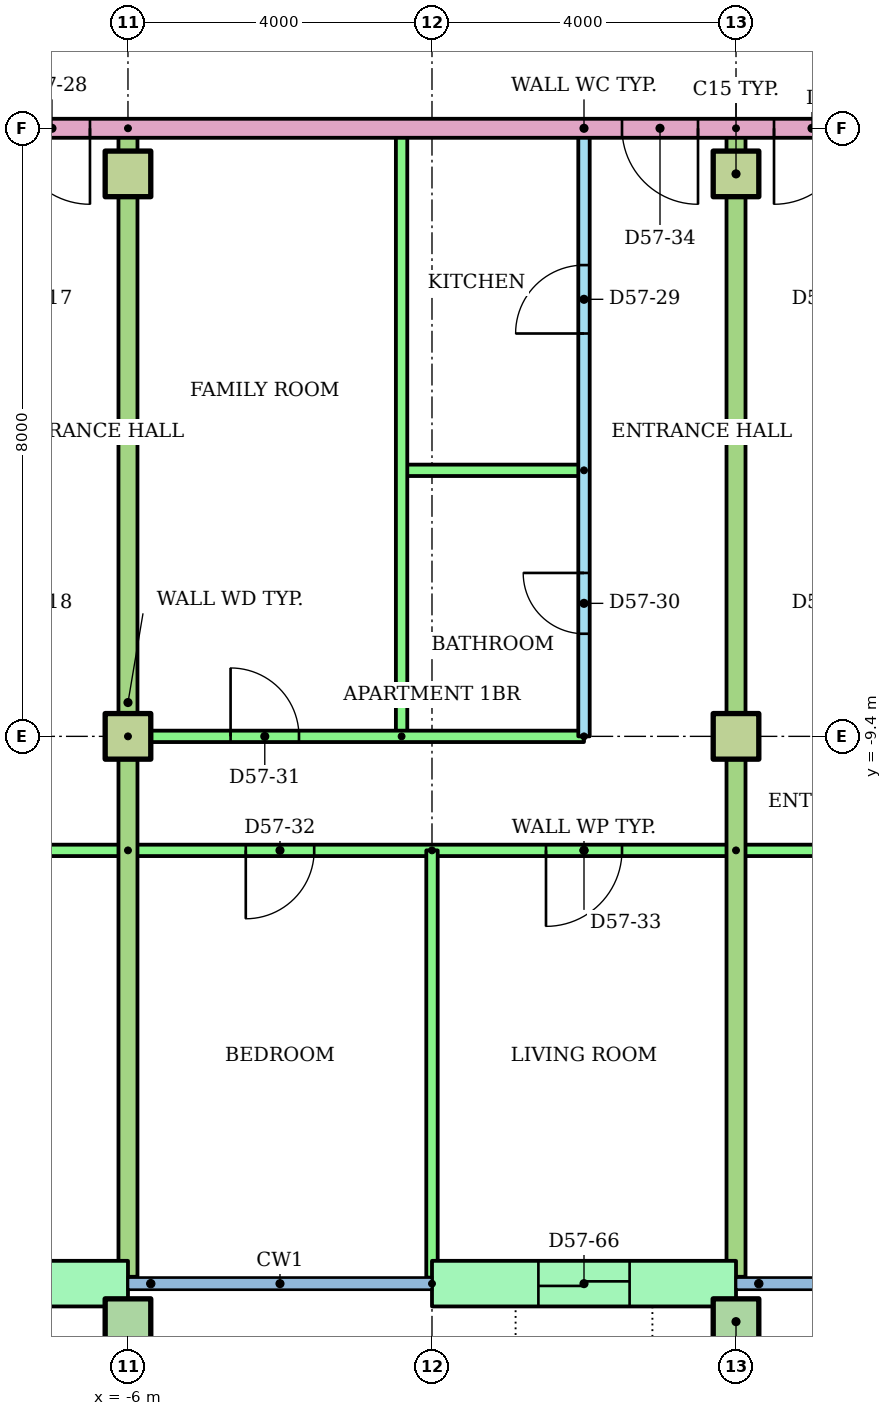
"""IFC4 building model, lengths in metres.
Left out: names, types, materials, properties, quantities, classifications, styles, units other than length and angle.
Written with IfcOpenShell. Run it as: python <this file> out.ifc"""

import sys

from ifc_helpers import new_model, si_unit, direction, frame, frame_2d, origin, origin_2d, place, context, subcontext, project, spatial, rectangle, hollow_rectangle, extrude, element, fill, save


model = new_model("IFC4")
c1 = context("Model", 3, precision=1e-05, world=origin(), true_north=direction((0.0, 1.0)))
c2 = subcontext(c1, "Body", "Model", "MODEL_VIEW")
j1 = project(units=[si_unit("LENGTHUNIT", "METRE"), si_unit("PLANEANGLEUNIT", "RADIAN")], contexts=[c1])
p1 = place(None, origin())
s1 = spatial("IfcSite", under=j1, at=p1, CompositionType="ELEMENT")
p2 = place(p1, origin())
s2 = spatial("IfcBuilding", under=s1, at=p2, CompositionType="ELEMENT")
p3 = place(p2, frame((0.0, 0.0, 220.4)))
s3 = spatial("IfcBuildingStorey", under=s2, at=p3, CompositionType="ELEMENT", Elevation=220.4)
for number, where in (
    (1, (-6.0, -17.1, 0.0)),
    (2, (2.0, -17.1, 0.0)),
):
    element("IfcColumn", number, at=place(p3, frame(where)), inside=s3, PredefinedType="COLUMN", context=c2, shape_type="SweptSolid", body=[
        extrude(hollow_rectangle(XDim=0.6, YDim=0.6, WallThickness=0.03, at=origin_2d()), origin(), (0.0, 0.0, 1.0), 3.2),
    ])
for number, where in (
    (3, (-6.0, -9.4, 0.0)),
    (4, (2.0, -9.4, 0.0)),
    (5, (-6.0, -2.0, 0.0)),
    (6, (2.0, -2.0, 0.0)),
):
    element("IfcColumn", number, at=place(p3, frame(where)), inside=s3, PredefinedType="COLUMN", context=c2, shape_type="SweptSolid", body=[
        extrude(rectangle(XDim=0.6, YDim=0.6, at=origin_2d()), origin(), (0.0, 0.0, 1.0), 3.2),
    ])
p4 = place(p3, frame((-10.0, -16.6, 0.0)))
e7 = element("IfcWall", 7, at=p4, inside=s3, PredefinedType="STANDARD", context=c2, shape_type="SweptSolid", body=[
    extrude(rectangle(XDim=4.0, YDim=0.6, at=frame_2d((2.0, 0.0))), origin(), (0.0, 0.0, 1.0), 2.92),
])
p5 = place(p4, frame((1.4, 0.0, 0.0)))
e8 = element("IfcOpeningElement", 8, at=p5, cuts=e7, PredefinedType="OPENING", context=c2, shape_type="SweptSolid", body=[
    extrude(rectangle(XDim=1.2, YDim=2.1, at=frame_2d((0.6, 1.05))), frame((0.0, 0.31, 0.0), z_axis=(0.0, -1.0, 0.0), x_axis=(1.0, 0.0, 0.0)), (0.0, 0.0, 1.0), 0.62),
])
p6 = place(p3, frame((-2.0, -16.6, 0.0)))
e9 = element("IfcWall", 9, at=p6, inside=s3, PredefinedType="STANDARD", context=c2, shape_type="SweptSolid", body=[
    extrude(rectangle(XDim=4.0, YDim=0.6, at=frame_2d((2.0, 0.0))), origin(), (0.0, 0.0, 1.0), 2.92),
])
p7 = place(p6, frame((1.4, 0.0, 0.0)))
e10 = element("IfcOpeningElement", 10, at=p7, cuts=e9, PredefinedType="OPENING", context=c2, shape_type="SweptSolid", body=[
    extrude(rectangle(XDim=1.2, YDim=2.1, at=frame_2d((0.6, 1.05))), frame((0.0, 0.31, 0.0), z_axis=(0.0, -1.0, 0.0), x_axis=(1.0, 0.0, 0.0)), (0.0, 0.0, 1.0), 0.62),
])
p8 = place(p3, frame((-6.0, -10.9, 0.0), z_axis=(0.0, 0.0, 1.0), x_axis=(-1.0, 0.0, 0.0)))
e11 = element("IfcWall", 11, at=p8, inside=s3, PredefinedType="PARTITIONING", context=c2, shape_type="SweptSolid", body=[
    extrude(rectangle(XDim=22.92, YDim=0.15, at=frame_2d((11.46, 0.0))), origin(), (0.0, 0.0, 1.0), 2.4),
])
p9 = place(p8, frame((20.0, 0.0, 0.0)))
e12 = element("IfcOpeningElement", 12, at=p9, cuts=e11, PredefinedType="OPENING", context=c2, shape_type="SweptSolid", body=[
    extrude(rectangle(XDim=0.9, YDim=2.1, at=frame_2d((0.45, 1.05))), frame((0.0, 0.085, 0.0), z_axis=(0.0, -1.0, 0.0), x_axis=(1.0, 0.0, 0.0)), (0.0, 0.0, 1.0), 0.17),
])
p10 = place(p8, frame((14.524, 0.0, 0.0)))
e13 = element("IfcOpeningElement", 13, at=p10, cuts=e11, PredefinedType="OPENING", context=c2, shape_type="SweptSolid", body=[
    extrude(rectangle(XDim=0.9, YDim=2.1, at=frame_2d((0.45, 1.05))), frame((0.0, 0.085, 0.0), z_axis=(0.0, -1.0, 0.0), x_axis=(1.0, 0.0, 0.0)), (0.0, 0.0, 1.0), 0.17),
])
p11 = place(p8, frame((9.55, 0.0, 0.0)))
e14 = element("IfcOpeningElement", 14, at=p11, cuts=e11, PredefinedType="OPENING", context=c2, shape_type="SweptSolid", body=[
    extrude(rectangle(XDim=0.9, YDim=2.1, at=frame_2d((0.45, 1.05))), frame((0.0, 0.085, 0.0), z_axis=(0.0, -1.0, 0.0), x_axis=(1.0, 0.0, 0.0)), (0.0, 0.0, 1.0), 0.17),
])
p12 = place(p8, frame((5.55, 0.0, 0.0)))
e15 = element("IfcOpeningElement", 15, at=p12, cuts=e11, PredefinedType="OPENING", context=c2, shape_type="SweptSolid", body=[
    extrude(rectangle(XDim=0.9, YDim=2.1, at=frame_2d((0.45, 1.05))), frame((0.0, 0.085, 0.0), z_axis=(0.0, -1.0, 0.0), x_axis=(1.0, 0.0, 0.0)), (0.0, 0.0, 1.0), 0.17),
])
p13 = place(p8, frame((1.5, 0.0, 0.0)))
e16 = element("IfcOpeningElement", 16, at=p13, cuts=e11, PredefinedType="OPENING", context=c2, shape_type="SweptSolid", body=[
    extrude(rectangle(XDim=1.0, YDim=2.1, at=frame_2d((0.5, 1.05))), frame((0.0, 0.085, 0.0), z_axis=(0.0, -1.0, 0.0), x_axis=(1.0, 0.0, 0.0)), (0.0, 0.0, 1.0), 0.17),
])
p14 = place(p3, frame((0.0, -9.4, 0.0), z_axis=(0.0, 0.0, 1.0), x_axis=(0.0, 1.0, 0.0)))
e17 = element("IfcWall", 17, at=p14, inside=s3, PredefinedType="PARTITIONING", context=c2, shape_type="SweptSolid", body=[
    extrude(rectangle(XDim=8.0, YDim=0.15, at=frame_2d((4.0, 0.0))), origin(), (0.0, 0.0, 1.0), 2.4),
])
p15 = place(p14, frame((5.3, 0.0, 0.0)))
e18 = element("IfcOpeningElement", 18, at=p15, cuts=e17, PredefinedType="OPENING", context=c2, shape_type="SweptSolid", body=[
    extrude(rectangle(XDim=0.9, YDim=2.1, at=frame_2d((0.45, 1.05))), frame((0.0, 0.085, 0.0), z_axis=(0.0, -1.0, 0.0), x_axis=(1.0, 0.0, 0.0)), (0.0, 0.0, 1.0), 0.17),
])
p16 = place(p14, frame((1.35, 0.0, 0.0)))
e19 = element("IfcOpeningElement", 19, at=p16, cuts=e17, PredefinedType="OPENING", context=c2, shape_type="SweptSolid", body=[
    extrude(rectangle(XDim=0.8, YDim=2.1, at=frame_2d((0.4, 1.05))), frame((0.0, 0.085, 0.0), z_axis=(0.0, -1.0, 0.0), x_axis=(1.0, 0.0, 0.0)), (0.0, 0.0, 1.0), 0.17),
])
p17 = place(p3, frame((0.0, -5.9, 0.0), z_axis=(0.0, 0.0, 1.0), x_axis=(-1.0, 0.0, 0.0)))
e20 = element("IfcWall", 20, at=p17, inside=s3, PredefinedType="PARTITIONING", context=c2, shape_type="SweptSolid", body=[
    extrude(rectangle(XDim=2.4, YDim=0.15, at=frame_2d((1.2, 0.0))), origin(), (0.0, 0.0, 1.0), 2.4),
])
p18 = place(p3, frame((-2.4, -9.4, 0.0), z_axis=(0.0, 0.0, 1.0), x_axis=(0.0, 1.0, 0.0)))
e21 = element("IfcWall", 21, at=p18, inside=s3, PredefinedType="PARTITIONING", context=c2, shape_type="SweptSolid", body=[
    extrude(rectangle(XDim=8.0, YDim=0.15, at=frame_2d((4.0, 0.0))), origin(), (0.0, 0.0, 1.0), 2.4),
])
p19 = place(p3, frame((-6.0, -9.4, 0.0)))
e22 = element("IfcWall", 22, at=p19, inside=s3, PredefinedType="PARTITIONING", context=c2, shape_type="SweptSolid", body=[
    extrude(rectangle(XDim=6.0, YDim=0.15, at=frame_2d((3.0, 0.0))), origin(), (0.0, 0.0, 1.0), 2.4),
])
p20 = place(p19, frame((1.35, 0.0, 0.0)))
e23 = element("IfcOpeningElement", 23, at=p20, cuts=e22, PredefinedType="OPENING", context=c2, shape_type="SweptSolid", body=[
    extrude(rectangle(XDim=0.9, YDim=2.1, at=frame_2d((0.45, 1.05))), frame((0.0, 0.085, 0.0), z_axis=(0.0, -1.0, 0.0), x_axis=(1.0, 0.0, 0.0)), (0.0, 0.0, 1.0), 0.17),
])
p21 = place(p3, frame((2.0, -10.9, 0.0), z_axis=(0.0, 0.0, 1.0), x_axis=(-1.0, 0.0, 0.0)))
e24 = element("IfcWall", 24, at=p21, inside=s3, PredefinedType="PARTITIONING", context=c2, shape_type="SweptSolid", body=[
    extrude(rectangle(XDim=8.0, YDim=0.15, at=frame_2d((4.0, 0.0))), origin(), (0.0, 0.0, 1.0), 2.4),
])
p22 = place(p21, frame((5.55, 0.0, 0.0)))
e25 = element("IfcOpeningElement", 25, at=p22, cuts=e24, PredefinedType="OPENING", context=c2, shape_type="SweptSolid", body=[
    extrude(rectangle(XDim=0.9, YDim=2.1, at=frame_2d((0.45, 1.05))), frame((0.0, 0.085, 0.0), z_axis=(0.0, -1.0, 0.0), x_axis=(1.0, 0.0, 0.0)), (0.0, 0.0, 1.0), 0.17),
])
p23 = place(p21, frame((1.5, 0.0, 0.0)))
e26 = element("IfcOpeningElement", 26, at=p23, cuts=e24, PredefinedType="OPENING", context=c2, shape_type="SweptSolid", body=[
    extrude(rectangle(XDim=1.0, YDim=2.1, at=frame_2d((0.5, 1.05))), frame((0.0, 0.085, 0.0), z_axis=(0.0, -1.0, 0.0), x_axis=(1.0, 0.0, 0.0)), (0.0, 0.0, 1.0), 0.17),
])
p24 = place(p3, frame((-2.0, -10.9, 0.0), z_axis=(0.0, 0.0, 1.0), x_axis=(0.0, -1.0, 0.0)))
e27 = element("IfcWall", 27, at=p24, inside=s3, PredefinedType="PARTITIONING", context=c2, shape_type="SweptSolid", body=[
    extrude(rectangle(XDim=5.621, YDim=0.15, at=frame_2d((2.811, 0.0))), origin(), (0.0, 0.0, 1.0), 2.4),
])
p25 = place(p3, frame((-6.0, -1.4, 0.0), z_axis=(0.0, 0.0, 1.0), x_axis=(0.0, -1.0, 0.0)))
e28 = element("IfcWall", 28, at=p25, inside=s3, PredefinedType="PARTITIONING", context=c2, shape_type="SweptSolid", body=[
    extrude(rectangle(XDim=15.11, YDim=0.25, at=frame_2d((7.555, 0.0))), origin(), (0.0, 0.0, 1.0), 2.4),
])
p26 = place(p3, frame((28.92, -10.9, 0.0), z_axis=(0.0, 0.0, 1.0), x_axis=(-1.0, 0.0, 0.0)))
e29 = element("IfcWall", 29, at=p26, inside=s3, PredefinedType="PARTITIONING", context=c2, shape_type="SweptSolid", body=[
    extrude(rectangle(XDim=26.92, YDim=0.15, at=frame_2d((13.46, 0.0))), origin(), (0.0, 0.0, 1.0), 2.4),
])
p27 = place(p26, frame((22.42, 0.0, 0.0)))
e30 = element("IfcOpeningElement", 30, at=p27, cuts=e29, PredefinedType="OPENING", context=c2, shape_type="SweptSolid", body=[
    extrude(rectangle(XDim=1.0, YDim=2.1, at=frame_2d((0.5, 1.05))), frame((0.0, 0.085, 0.0), z_axis=(0.0, -1.0, 0.0), x_axis=(1.0, 0.0, 0.0)), (0.0, 0.0, 1.0), 0.17),
])
p28 = place(p26, frame((16.47, 0.0, 0.0)))
e31 = element("IfcOpeningElement", 31, at=p28, cuts=e29, PredefinedType="OPENING", context=c2, shape_type="SweptSolid", body=[
    extrude(rectangle(XDim=0.9, YDim=2.1, at=frame_2d((0.45, 1.05))), frame((0.0, 0.085, 0.0), z_axis=(0.0, -1.0, 0.0), x_axis=(1.0, 0.0, 0.0)), (0.0, 0.0, 1.0), 0.17),
])
p29 = place(p26, frame((12.47, 0.0, 0.0)))
e32 = element("IfcOpeningElement", 32, at=p29, cuts=e29, PredefinedType="OPENING", context=c2, shape_type="SweptSolid", body=[
    extrude(rectangle(XDim=0.9, YDim=2.1, at=frame_2d((0.45, 1.05))), frame((0.0, 0.085, 0.0), z_axis=(0.0, -1.0, 0.0), x_axis=(1.0, 0.0, 0.0)), (0.0, 0.0, 1.0), 0.17),
])
p30 = place(p26, frame((7.27, 0.0, 0.0)))
e33 = element("IfcOpeningElement", 33, at=p30, cuts=e29, PredefinedType="OPENING", context=c2, shape_type="SweptSolid", body=[
    extrude(rectangle(XDim=0.9, YDim=2.1, at=frame_2d((0.45, 1.05))), frame((0.0, 0.085, 0.0), z_axis=(0.0, -1.0, 0.0), x_axis=(1.0, 0.0, 0.0)), (0.0, 0.0, 1.0), 0.17),
])
p31 = place(p26, frame((1.544, 0.0, 0.0)))
e34 = element("IfcOpeningElement", 34, at=p31, cuts=e29, PredefinedType="OPENING", context=c2, shape_type="SweptSolid", body=[
    extrude(rectangle(XDim=0.9, YDim=2.1, at=frame_2d((0.45, 1.05))), frame((0.0, 0.085, 0.0), z_axis=(0.0, -1.0, 0.0), x_axis=(1.0, 0.0, 0.0)), (0.0, 0.0, 1.0), 0.17),
])
p32 = place(p3, frame((2.0, -1.4, 0.0), z_axis=(0.0, 0.0, 1.0), x_axis=(0.0, -1.0, 0.0)))
e35 = element("IfcWall", 35, at=p32, inside=s3, PredefinedType="PARTITIONING", context=c2, shape_type="SweptSolid", body=[
    extrude(rectangle(XDim=15.11, YDim=0.25, at=frame_2d((7.555, 0.0))), origin(), (0.0, 0.0, 1.0), 2.4),
])
p33 = place(p3, frame((14.0, -1.4, 0.0), z_axis=(0.0, 0.0, 1.0), x_axis=(-1.0, 0.0, 0.0)))
e36 = element("IfcWall", 36, at=p33, inside=s3, PredefinedType="PARTITIONING", context=c2, shape_type="SweptSolid", body=[
    extrude(rectangle(XDim=28.0, YDim=0.25, at=frame_2d((14.0, 0.0))), origin(), (0.0, 0.0, 1.0), 2.4),
])
p34 = place(p33, frame((20.5, 0.0, 0.0)))
e37 = element("IfcOpeningElement", 37, at=p34, cuts=e36, PredefinedType="OPENING", context=c2, shape_type="SweptSolid", body=[
    extrude(rectangle(XDim=1.0, YDim=2.1, at=frame_2d((0.5, 1.05))), frame((0.0, 0.135, 0.0), z_axis=(0.0, -1.0, 0.0), x_axis=(1.0, 0.0, 0.0)), (0.0, 0.0, 1.0), 0.27),
])
p35 = place(p33, frame((12.5, 0.0, 0.0)))
e38 = element("IfcOpeningElement", 38, at=p35, cuts=e36, PredefinedType="OPENING", context=c2, shape_type="SweptSolid", body=[
    extrude(rectangle(XDim=1.0, YDim=2.1, at=frame_2d((0.5, 1.05))), frame((0.0, 0.135, 0.0), z_axis=(0.0, -1.0, 0.0), x_axis=(1.0, 0.0, 0.0)), (0.0, 0.0, 1.0), 0.27),
])
p36 = place(p33, frame((10.5, 0.0, 0.0)))
e39 = element("IfcOpeningElement", 39, at=p36, cuts=e36, PredefinedType="OPENING", context=c2, shape_type="SweptSolid", body=[
    extrude(rectangle(XDim=1.0, YDim=2.1, at=frame_2d((0.5, 1.05))), frame((0.0, 0.135, 0.0), z_axis=(0.0, -1.0, 0.0), x_axis=(1.0, 0.0, 0.0)), (0.0, 0.0, 1.0), 0.27),
])
p37 = place(p34, origin())
e40 = element("IfcDoor", 40, at=p37, inside=s3, OperationType="SINGLE_SWING_LEFT", PredefinedType="DOOR", context=c2, shape_type="SweptSolid", body=[
    extrude(rectangle(XDim=1.0, YDim=2.1, at=frame_2d((0.5, 1.05))), frame((0.0, 0.025, 0.0), z_axis=(0.0, -1.0, 0.0), x_axis=(1.0, 0.0, 0.0)), (0.0, 0.0, 1.0), 0.05),
])
fill(e37, e40)
p38 = place(p15, origin())
e41 = element("IfcDoor", 41, at=p38, inside=s3, OperationType="SINGLE_SWING_LEFT", PredefinedType="DOOR", context=c2, shape_type="SweptSolid", body=[
    extrude(rectangle(XDim=0.9, YDim=2.1, at=frame_2d((0.45, 1.05))), frame((0.0, 0.025, 0.0), z_axis=(0.0, -1.0, 0.0), x_axis=(1.0, 0.0, 0.0)), (0.0, 0.0, 1.0), 0.05),
])
fill(e18, e41)
p39 = place(p16, origin())
e42 = element("IfcDoor", 42, at=p39, inside=s3, OperationType="SINGLE_SWING_RIGHT", PredefinedType="DOOR", context=c2, shape_type="SweptSolid", body=[
    extrude(rectangle(XDim=0.8, YDim=2.1, at=frame_2d((0.4, 1.05))), frame((0.0, 0.025, 0.0), z_axis=(0.0, -1.0, 0.0), x_axis=(1.0, 0.0, 0.0)), (0.0, 0.0, 1.0), 0.05),
])
fill(e19, e42)
p40 = place(p20, origin())
e43 = element("IfcDoor", 43, at=p40, inside=s3, OperationType="SINGLE_SWING_LEFT", PredefinedType="DOOR", context=c2, shape_type="SweptSolid", body=[
    extrude(rectangle(XDim=0.9, YDim=2.1, at=frame_2d((0.45, 1.05))), frame((0.0, 0.025, 0.0), z_axis=(0.0, -1.0, 0.0), x_axis=(1.0, 0.0, 0.0)), (0.0, 0.0, 1.0), 0.05),
])
fill(e23, e43)
p41 = place(p22, origin())
e44 = element("IfcDoor", 44, at=p41, inside=s3, OperationType="SINGLE_SWING_RIGHT", PredefinedType="DOOR", context=c2, shape_type="SweptSolid", body=[
    extrude(rectangle(XDim=0.9, YDim=2.1, at=frame_2d((0.45, 1.05))), frame((0.0, 0.025, 0.0), z_axis=(0.0, -1.0, 0.0), x_axis=(1.0, 0.0, 0.0)), (0.0, 0.0, 1.0), 0.05),
])
fill(e25, e44)
p42 = place(p23, origin())
e45 = element("IfcDoor", 45, at=p42, inside=s3, OperationType="SINGLE_SWING_RIGHT", PredefinedType="DOOR", context=c2, shape_type="SweptSolid", body=[
    extrude(rectangle(XDim=1.0, YDim=2.1, at=frame_2d((0.5, 1.05))), frame((0.0, 0.025, 0.0), z_axis=(0.0, -1.0, 0.0), x_axis=(1.0, 0.0, 0.0)), (0.0, 0.0, 1.0), 0.05),
])
fill(e26, e45)
p43 = place(p35, origin())
e46 = element("IfcDoor", 46, at=p43, inside=s3, OperationType="SINGLE_SWING_LEFT", PredefinedType="DOOR", context=c2, shape_type="SweptSolid", body=[
    extrude(rectangle(XDim=1.0, YDim=2.1, at=frame_2d((0.5, 1.05))), frame((0.0, 0.025, 0.0), z_axis=(0.0, -1.0, 0.0), x_axis=(1.0, 0.0, 0.0)), (0.0, 0.0, 1.0), 0.05),
])
fill(e38, e46)
p44 = place(p36, origin())
e47 = element("IfcDoor", 47, at=p44, inside=s3, OperationType="SINGLE_SWING_RIGHT", PredefinedType="DOOR", context=c2, shape_type="SweptSolid", body=[
    extrude(rectangle(XDim=1.0, YDim=2.1, at=frame_2d((0.5, 1.05))), frame((0.0, 0.025, 0.0), z_axis=(0.0, -1.0, 0.0), x_axis=(1.0, 0.0, 0.0)), (0.0, 0.0, 1.0), 0.05),
])
fill(e39, e47)
p45 = place(p7, origin())
e48 = element("IfcDoor", 48, at=p45, inside=s3, OperationType="SLIDING_TO_LEFT", PredefinedType="DOOR", context=c2, shape_type="SweptSolid", body=[
    extrude(rectangle(XDim=1.2, YDim=2.1, at=frame_2d((0.6, 1.05))), frame((0.0, 0.025, 0.0), z_axis=(0.0, -1.0, 0.0), x_axis=(1.0, 0.0, 0.0)), (0.0, 0.0, 1.0), 0.05),
])
fill(e10, e48)
save(model, sys.argv[1])
